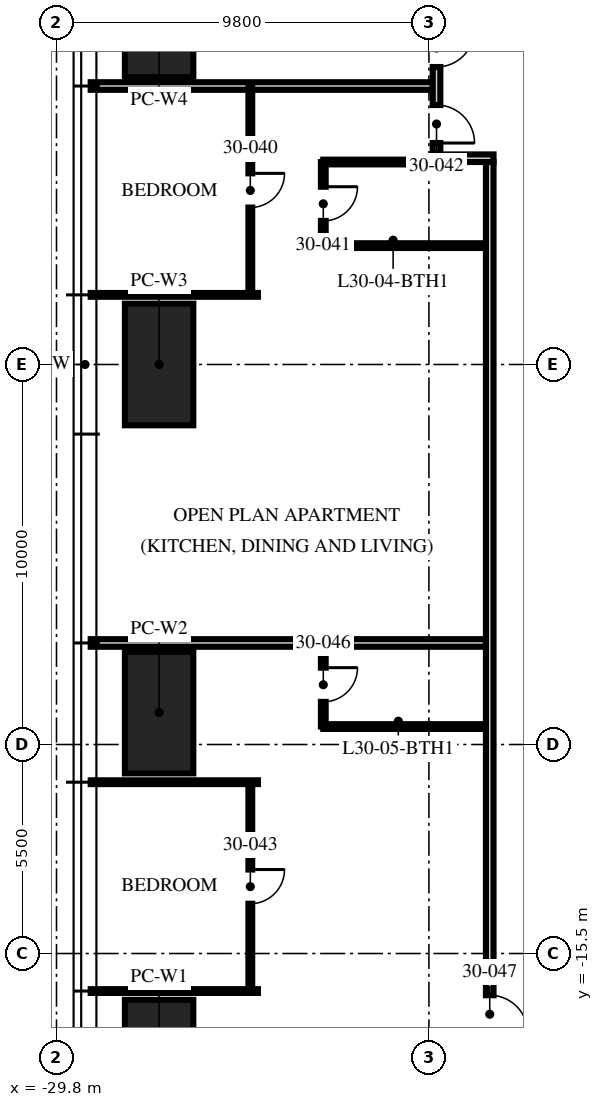
"""IFC4 building model, lengths in metres.
Left out: names, types, materials, properties, quantities, classifications, styles, units other than length and angle.
Written with IfcOpenShell. Run it as: python <this file> out.ifc"""

import sys

from ifc_helpers import new_model, si_unit, direction, frame, frame_2d, origin, origin_2d, place, context, subcontext, project, spatial, rectangle, extrude, element, fill, save


model = new_model("IFC4")
c1 = context("Model", 3, precision=1e-05, world=origin(), true_north=direction((0.0, 1.0)))
c2 = subcontext(c1, "Body", "Model", "MODEL_VIEW")
j1 = project(units=[si_unit("LENGTHUNIT", "METRE"), si_unit("PLANEANGLEUNIT", "RADIAN")], contexts=[c1])
p1 = place(None, origin())
s1 = spatial("IfcSite", under=j1, at=p1, CompositionType="ELEMENT")
p2 = place(p1, origin())
s2 = spatial("IfcBuilding", under=s1, at=p2, CompositionType="ELEMENT")
p3 = place(p2, frame((0.0, 0.0, 122.25)))
s3 = spatial("IfcBuildingStorey", under=s2, at=p3, CompositionType="ELEMENT", Elevation=122.25)
for number, where, z_axis, x_axis in (
    (1, (-27.1, -18.32, 0.0), (0.0, 0.0, 1.0), (0.0, 1.0, 0.0)),
    (2, (-27.1, -9.16, 0.0), (0.0, 0.0, 1.0), (0.0, 1.0, 0.0)),
    (3, (-27.1, 0.0, 0.0), (0.0, 0.0, 1.0), (0.0, 1.0, 0.0)),
    (4, (-27.1, 9.16, 0.0), (0.0, 0.0, 1.0), (0.0, 1.0, 0.0)),
):
    element("IfcColumn", number, at=place(p3, frame(where, z_axis=z_axis, x_axis=x_axis)), inside=s3, PredefinedType="COLUMN", context=c2, shape_type="SweptSolid", body=[
        extrude(rectangle(XDim=3.2, YDim=1.8, at=origin_2d()), origin(), (0.0, 0.0, 1.0), 3.75),
    ])
p4 = place(p3, frame((-19.9, 7.328, 0.0), z_axis=(0.0, 0.0, 1.0), x_axis=(-1.0, 0.0, 0.0)))
e5 = element("IfcWall", 5, at=p4, inside=s3, PredefinedType="PARTITIONING", context=c2, shape_type="SweptSolid", body=[
    extrude(rectangle(XDim=9.0, YDim=0.2, at=frame_2d((4.5, 0.0))), origin(), (0.0, 0.0, 1.0), 2.81),
])
p5 = place(p3, frame((-24.5, 1.832, 0.0), z_axis=(0.0, 0.0, 1.0), x_axis=(-1.0, 0.0, 0.0)))
e6 = element("IfcWall", 6, at=p5, inside=s3, PredefinedType="PARTITIONING", context=c2, shape_type="SweptSolid", body=[
    extrude(rectangle(XDim=4.4, YDim=0.1, at=frame_2d((2.2, 0.0))), origin(), (0.0, 0.0, 1.0), 2.81),
])
p6 = place(p3, frame((-18.5, -7.328, 0.0), z_axis=(0.0, 0.0, 1.0), x_axis=(-1.0, 0.0, 0.0)))
e7 = element("IfcWall", 7, at=p6, inside=s3, PredefinedType="PARTITIONING", context=c2, shape_type="SweptSolid", body=[
    extrude(rectangle(XDim=10.4, YDim=0.2, at=frame_2d((5.2, 0.0))), origin(), (0.0, 0.0, 1.0), 2.81),
])
for number, where, z_axis, x_axis in (
    (8, (-24.5, -10.992, 0.0), (0.0, 0.0, 1.0), (-1.0, 0.0, 0.0)),
    (9, (-24.5, -16.488, 0.0), (0.0, 0.0, 1.0), (-1.0, 0.0, 0.0)),
):
    element("IfcWall", number, at=place(p3, frame(where, z_axis=z_axis, x_axis=x_axis)), inside=s3, PredefinedType="PARTITIONING", context=c2, shape_type="SweptSolid", body=[
        extrude(rectangle(XDim=4.4, YDim=0.1, at=frame_2d((2.2, 0.0))), origin(), (0.0, 0.0, 1.0), 2.81),
    ])
p7 = place(p3, frame((-24.7, 7.328, 0.0), z_axis=(0.0, 0.0, 1.0), x_axis=(0.0, -1.0, 0.0)))
e10 = element("IfcWall", 10, at=p7, inside=s3, PredefinedType="PARTITIONING", context=c2, shape_type="SweptSolid", body=[
    extrude(rectangle(XDim=5.496, YDim=0.1, at=frame_2d((2.748, 0.0))), origin(), (0.0, 0.0, 1.0), 2.81),
])
p8 = place(p7, frame((2.298, 0.0, 0.0)))
e11 = element("IfcOpeningElement", 11, at=p8, cuts=e10, PredefinedType="OPENING", context=c2, shape_type="SweptSolid", body=[
    extrude(rectangle(XDim=0.9, YDim=2.1, at=frame_2d((0.45, 1.05))), frame((0.0, 0.06, 0.0), z_axis=(0.0, -1.0, 0.0), x_axis=(1.0, 0.0, 0.0)), (0.0, 0.0, 1.0), 0.12),
])
p9 = place(p3, frame((-22.78, 5.328, 0.0), z_axis=(0.0, 0.0, 1.0), x_axis=(0.0, -1.0, 0.0)))
e12 = element("IfcWall", 12, at=p9, inside=s3, PredefinedType="PARTITIONING", context=c2, shape_type="SweptSolid", body=[
    extrude(rectangle(XDim=2.2, YDim=0.125, at=frame_2d((1.1, 0.0))), origin(), (0.0, 0.0, 1.0), 2.81),
])
p10 = place(p9, frame((0.65, 0.0, 0.0)))
e13 = element("IfcOpeningElement", 13, at=p10, cuts=e12, PredefinedType="OPENING", context=c2, shape_type="SweptSolid", body=[
    extrude(rectangle(XDim=0.9, YDim=2.1, at=frame_2d((0.45, 1.05))), frame((0.0, 0.073, 0.0), z_axis=(0.0, -1.0, 0.0), x_axis=(1.0, 0.0, 0.0)), (0.0, 0.0, 1.0), 0.145),
])
p11 = place(p3, frame((-19.97, 5.328, 0.0), z_axis=(0.0, 0.0, 1.0), x_axis=(-1.0, 0.0, 0.0)))
e14 = element("IfcWall", 14, at=p11, inside=s3, PredefinedType="PARTITIONING", context=c2, shape_type="SweptSolid", body=[
    extrude(rectangle(XDim=2.81, YDim=0.125, at=frame_2d((1.405, 0.0))), origin(), (0.0, 0.0, 1.0), 3.5),
])
p12 = place(p3, frame((-18.5, 3.128, 0.0), z_axis=(0.0, 0.0, 1.0), x_axis=(-1.0, 0.0, 0.0)))
e15 = element("IfcWall", 15, at=p12, inside=s3, PredefinedType="PARTITIONING", context=c2, shape_type="SweptSolid", body=[
    extrude(rectangle(XDim=4.28, YDim=0.125, at=frame_2d((2.14, 0.0))), origin(), (0.0, 0.0, 1.0), 3.5),
])
p13 = place(p3, frame((-24.7, -10.992, 0.0), z_axis=(0.0, 0.0, 1.0), x_axis=(0.0, -1.0, 0.0)))
e16 = element("IfcWall", 16, at=p13, inside=s3, PredefinedType="PARTITIONING", context=c2, shape_type="SweptSolid", body=[
    extrude(rectangle(XDim=5.496, YDim=0.1, at=frame_2d((2.748, 0.0))), origin(), (0.0, 0.0, 1.0), 2.81),
])
p14 = place(p13, frame((2.298, 0.0, 0.0)))
e17 = element("IfcOpeningElement", 17, at=p14, cuts=e16, PredefinedType="OPENING", context=c2, shape_type="SweptSolid", body=[
    extrude(rectangle(XDim=0.9, YDim=2.1, at=frame_2d((0.45, 1.05))), frame((0.0, 0.06, 0.0), z_axis=(0.0, -1.0, 0.0), x_axis=(1.0, 0.0, 0.0)), (0.0, 0.0, 1.0), 0.12),
])
p15 = place(p3, frame((-22.78, -7.328, 0.0), z_axis=(0.0, 0.0, 1.0), x_axis=(0.0, -1.0, 0.0)))
e18 = element("IfcWall", 18, at=p15, inside=s3, PredefinedType="PARTITIONING", context=c2, shape_type="SweptSolid", body=[
    extrude(rectangle(XDim=2.2, YDim=0.125, at=frame_2d((1.1, 0.0))), origin(), (0.0, 0.0, 1.0), 2.7),
])
p16 = place(p15, frame((0.65, 0.0, 0.0)))
e19 = element("IfcOpeningElement", 19, at=p16, cuts=e18, PredefinedType="OPENING", context=c2, shape_type="SweptSolid", body=[
    extrude(rectangle(XDim=0.9, YDim=2.1, at=frame_2d((0.45, 1.05))), frame((0.0, 0.073, 0.0), z_axis=(0.0, -1.0, 0.0), x_axis=(1.0, 0.0, 0.0)), (0.0, 0.0, 1.0), 0.145),
])
p17 = place(p3, frame((-18.5, -9.528, 0.0), z_axis=(0.0, 0.0, 1.0), x_axis=(-1.0, 0.0, 0.0)))
e20 = element("IfcWall", 20, at=p17, inside=s3, PredefinedType="PARTITIONING", context=c2, shape_type="SweptSolid", body=[
    extrude(rectangle(XDim=4.28, YDim=0.125, at=frame_2d((2.14, 0.0))), origin(), (0.0, 0.0, 1.0), 3.5),
])
p18 = place(p3, frame((-18.3, 5.428, 0.0), z_axis=(0.0, 0.0, 1.0), x_axis=(-1.0, 0.0, 0.0)))
e21 = element("IfcWall", 21, at=p18, inside=s3, PredefinedType="PARTITIONING", context=c2, shape_type="SweptSolid", body=[
    extrude(rectangle(XDim=1.6, YDim=0.2, at=frame_2d((0.8, 0.0))), origin(), (0.0, 0.0, 1.0), 3.5),
])
p19 = place(p3, frame((-19.8, 9.128, 0.0), z_axis=(0.0, 0.0, 1.0), x_axis=(0.0, -1.0, 0.0)))
e22 = element("IfcWall", 22, at=p19, inside=s3, PredefinedType="PARTITIONING", context=c2, shape_type="SweptSolid", body=[
    extrude(rectangle(XDim=3.6, YDim=0.2, at=frame_2d((1.8, 0.0))), origin(), (0.0, 0.0, 1.0), 2.7),
])
p20 = place(p19, frame((0.3, 0.0, 0.0)))
e23 = element("IfcOpeningElement", 23, at=p20, cuts=e22, PredefinedType="OPENING", context=c2, shape_type="SweptSolid", body=[
    extrude(rectangle(XDim=1.0, YDim=2.2, at=frame_2d((0.5, 1.1))), frame((0.0, 0.11, 0.0), z_axis=(0.0, -1.0, 0.0), x_axis=(1.0, 0.0, 0.0)), (0.0, 0.0, 1.0), 0.22),
])
p21 = place(p19, frame((2.3, 0.0, 0.0)))
e24 = element("IfcOpeningElement", 24, at=p21, cuts=e22, PredefinedType="OPENING", context=c2, shape_type="SweptSolid", body=[
    extrude(rectangle(XDim=1.0, YDim=2.2, at=frame_2d((0.5, 1.1))), frame((0.0, 0.11, 0.0), z_axis=(0.0, -1.0, 0.0), x_axis=(1.0, 0.0, 0.0)), (0.0, 0.0, 1.0), 0.22),
])
p22 = place(p3, frame((-18.4, 5.328, 0.0), z_axis=(0.0, 0.0, 1.0), x_axis=(0.0, -1.0, 0.0)))
e25 = element("IfcWall", 25, at=p22, inside=s3, PredefinedType="PARTITIONING", context=c2, shape_type="SweptSolid", body=[
    extrude(rectangle(XDim=23.628, YDim=0.2, at=frame_2d((11.814, 0.0))), origin(), (0.0, 0.0, 1.0), 2.3),
])
p23 = place(p22, frame((21.926, 0.0, 0.0)))
e26 = element("IfcOpeningElement", 26, at=p23, cuts=e25, PredefinedType="OPENING", context=c2, shape_type="SweptSolid", body=[
    extrude(rectangle(XDim=1.0, YDim=2.2, at=frame_2d((0.5, 1.1))), frame((0.0, 0.11, 0.0), z_axis=(0.0, -1.0, 0.0), x_axis=(1.0, 0.0, 0.0)), (0.0, 0.0, 1.0), 0.22),
])
p24 = place(p20, origin())
e27 = element("IfcDoor", 27, at=p24, inside=s3, OperationType="SINGLE_SWING_LEFT", PredefinedType="DOOR", context=c2, shape_type="SweptSolid", body=[
    extrude(rectangle(XDim=1.0, YDim=2.2, at=frame_2d((0.5, 1.1))), frame((0.0, 0.025, 0.0), z_axis=(0.0, -1.0, 0.0), x_axis=(1.0, 0.0, 0.0)), (0.0, 0.0, 1.0), 0.05),
])
fill(e23, e27)
p25 = place(p8, origin())
e28 = element("IfcDoor", 28, at=p25, inside=s3, OperationType="SINGLE_SWING_LEFT", PredefinedType="DOOR", context=c2, shape_type="SweptSolid", body=[
    extrude(rectangle(XDim=0.9, YDim=2.1, at=frame_2d((0.45, 1.05))), frame((0.0, 0.025, 0.0), z_axis=(0.0, -1.0, 0.0), x_axis=(1.0, 0.0, 0.0)), (0.0, 0.0, 1.0), 0.05),
])
fill(e11, e28)
p26 = place(p10, origin())
e29 = element("IfcDoor", 29, at=p26, inside=s3, OperationType="SINGLE_SWING_LEFT", PredefinedType="DOOR", context=c2, shape_type="SweptSolid", body=[
    extrude(rectangle(XDim=0.9, YDim=2.1, at=frame_2d((0.45, 1.05))), frame((0.0, 0.025, 0.0), z_axis=(0.0, -1.0, 0.0), x_axis=(1.0, 0.0, 0.0)), (0.0, 0.0, 1.0), 0.05),
])
fill(e13, e29)
p27 = place(p21, origin())
e30 = element("IfcDoor", 30, at=p27, inside=s3, OperationType="SINGLE_SWING_RIGHT", PredefinedType="DOOR", context=c2, shape_type="SweptSolid", body=[
    extrude(rectangle(XDim=1.0, YDim=2.2, at=frame_2d((0.5, 1.1))), frame((0.0, 0.025, 0.0), z_axis=(0.0, -1.0, 0.0), x_axis=(1.0, 0.0, 0.0)), (0.0, 0.0, 1.0), 0.05),
])
fill(e24, e30)
p28 = place(p14, origin())
e31 = element("IfcDoor", 31, at=p28, inside=s3, OperationType="SINGLE_SWING_LEFT", PredefinedType="DOOR", context=c2, shape_type="SweptSolid", body=[
    extrude(rectangle(XDim=0.9, YDim=2.1, at=frame_2d((0.45, 1.05))), frame((0.0, 0.025, 0.0), z_axis=(0.0, -1.0, 0.0), x_axis=(1.0, 0.0, 0.0)), (0.0, 0.0, 1.0), 0.05),
])
fill(e17, e31)
p29 = place(p16, origin())
e32 = element("IfcDoor", 32, at=p29, inside=s3, OperationType="SINGLE_SWING_LEFT", PredefinedType="DOOR", context=c2, shape_type="SweptSolid", body=[
    extrude(rectangle(XDim=0.9, YDim=2.1, at=frame_2d((0.45, 1.05))), frame((0.0, 0.025, 0.0), z_axis=(0.0, -1.0, 0.0), x_axis=(1.0, 0.0, 0.0)), (0.0, 0.0, 1.0), 0.05),
])
fill(e19, e32)
p30 = place(p23, origin())
e33 = element("IfcDoor", 33, at=p30, inside=s3, OperationType="SINGLE_SWING_RIGHT", PredefinedType="DOOR", context=c2, shape_type="SweptSolid", body=[
    extrude(rectangle(XDim=1.0, YDim=2.2, at=frame_2d((0.5, 1.1))), frame((0.0, 0.025, 0.0), z_axis=(0.0, -1.0, 0.0), x_axis=(1.0, 0.0, 0.0)), (0.0, 0.0, 1.0), 0.05),
])
fill(e26, e33)
save(model, sys.argv[1])
